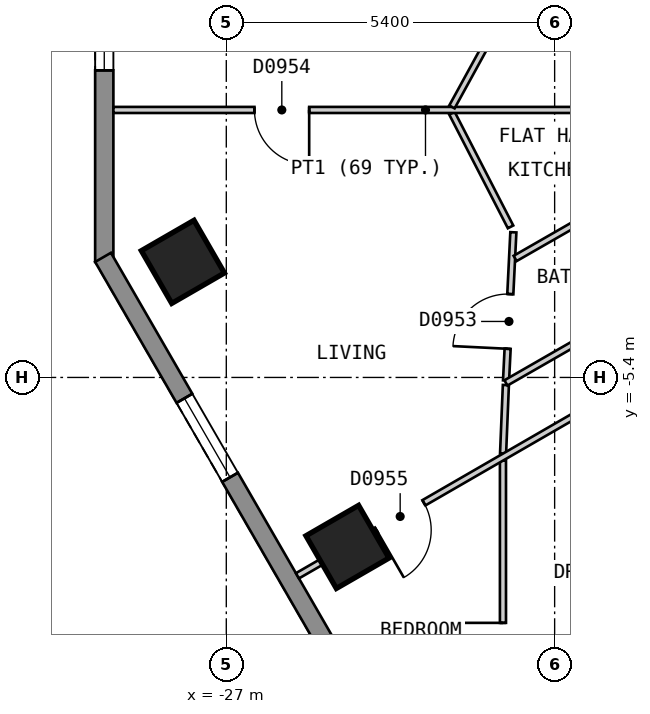
"""IFC4 building model, lengths in metres.
Left out: names, types, materials, properties, quantities, classifications, styles, units other than length and angle.
Written with IfcOpenShell. Run it as: python <this file> out.ifc"""

import sys

from ifc_helpers import new_model, si_unit, direction, frame, frame_2d, origin, origin_2d, place, context, subcontext, project, spatial, polyline, rectangle, outline, extrude, element, fill, save


model = new_model("IFC4")
c1 = context("Model", 3, precision=1e-05, world=origin(), true_north=direction((0.0, 1.0)))
c2 = subcontext(c1, "Body", "Model", "MODEL_VIEW")
j1 = project(units=[si_unit("LENGTHUNIT", "METRE"), si_unit("PLANEANGLEUNIT", "RADIAN")], contexts=[c1])
p1 = place(None, origin())
s1 = spatial("IfcSite", under=j1, at=p1, CompositionType="ELEMENT")
p2 = place(p1, origin())
s2 = spatial("IfcBuilding", under=s1, at=p2, CompositionType="ELEMENT")
p3 = place(p2, frame((0.0, 0.0, 102.0)))
s3 = spatial("IfcBuildingStorey", under=s2, at=p3, CompositionType="ELEMENT", Elevation=102.0)
for number, where, z_axis, x_axis in (
    (1, (-27.714, -3.499, 0.0), (0.0, 0.0, 1.0), (0.5, -0.866, 0.0)),
    (2, (-25.007, -8.187, 0.0), (0.0, 0.0, 1.0), (0.5, -0.866, 0.0)),
):
    element("IfcColumn", number, at=place(p3, frame(where, z_axis=z_axis, x_axis=x_axis)), inside=s3, PredefinedType="COLUMN", context=c2, shape_type="SweptSolid", body=[
        extrude(rectangle(XDim=1.0, YDim=1.0, at=origin_2d()), origin(), (0.0, 0.0, 1.0), 3.0),
    ])
p4 = place(p3, frame((-29.007, 1.5, 0.0), z_axis=(0.0, 0.0, 1.0), x_axis=(0.0, -1.0, 0.0)))
e3 = element("IfcWall", 3, at=p4, inside=s3, PredefinedType="SOLIDWALL", context=c2, shape_type="SweptSolid", body=[
    extrude(outline(polyline([(0.0, -0.15), (5.0, -0.15), (4.92, 0.15), (0.08, 0.15), (0.0, -0.15)])), origin(), (0.0, 0.0, 1.0), 2.7),
])
p5 = place(p4, frame((0.65, 0.0, 0.15)))
e4 = element("IfcOpeningElement", 4, at=p5, cuts=e3, PredefinedType="OPENING", context=c2, shape_type="SweptSolid", body=[
    extrude(rectangle(XDim=1.2, YDim=2.1, at=frame_2d((0.6, 1.05))), frame((0.0, 0.16, 0.0), z_axis=(0.0, -1.0, 0.0), x_axis=(1.0, 0.0, 0.0)), (0.0, 0.0, 1.0), 0.32),
])
p6 = place(p3, frame((-29.027, -3.425, 0.0), z_axis=(0.0, 0.0, 1.0), x_axis=(0.500035407905, -0.866004960056, 0.0)))
e5 = element("IfcWall", 5, at=p6, inside=s3, PredefinedType="SOLIDWALL", context=c2, shape_type="SweptSolid", body=[
    extrude(outline(polyline([(0.0, -0.15), (23.094, -0.15), (23.014, 0.15), (0.08, 0.15), (0.0, -0.15)])), origin(), (0.0, 0.0, 1.0), 2.7),
])
p7 = place(p6, frame((2.677, 0.0, 0.15)))
e6 = element("IfcOpeningElement", 6, at=p7, cuts=e5, PredefinedType="OPENING", context=c2, shape_type="SweptSolid", body=[
    extrude(rectangle(XDim=1.5, YDim=2.1, at=frame_2d((0.75, 1.05))), frame((0.0, 0.16, 0.0), z_axis=(0.0, -1.0, 0.0), x_axis=(1.0, 0.0, 0.0)), (0.0, 0.0, 1.0), 0.32),
])
p8 = place(p6, frame((8.091, 0.0, 0.15)))
e7 = element("IfcOpeningElement", 7, at=p8, cuts=e5, PredefinedType="OPENING", context=c2, shape_type="SweptSolid", body=[
    extrude(rectangle(XDim=1.5, YDim=2.1, at=frame_2d((0.75, 1.05))), frame((0.0, 0.16, 0.0), z_axis=(0.0, -1.0, 0.0), x_axis=(1.0, 0.0, 0.0)), (0.0, 0.0, 1.0), 0.32),
])
p9 = place(p6, frame((13.504, 0.0, 0.15)))
e8 = element("IfcOpeningElement", 8, at=p9, cuts=e5, PredefinedType="OPENING", context=c2, shape_type="SweptSolid", body=[
    extrude(rectangle(XDim=1.5, YDim=2.1, at=frame_2d((0.75, 1.05))), frame((0.0, 0.16, 0.0), z_axis=(0.0, -1.0, 0.0), x_axis=(1.0, 0.0, 0.0)), (0.0, 0.0, 1.0), 0.32),
])
p10 = place(p6, frame((18.917, 0.0, 0.15)))
e9 = element("IfcOpeningElement", 9, at=p10, cuts=e5, PredefinedType="OPENING", context=c2, shape_type="SweptSolid", body=[
    extrude(rectangle(XDim=1.5, YDim=2.1, at=frame_2d((0.75, 1.05))), frame((0.0, 0.16, 0.0), z_axis=(0.0, -1.0, 0.0), x_axis=(1.0, 0.0, 0.0)), (0.0, 0.0, 1.0), 0.32),
])
p11 = place(p3, frame((-23.289, -1.054, 0.0), z_axis=(0.0, 0.0, 1.0), x_axis=(0.458226112305, -0.888835659726, 0.0)))
e10 = element("IfcWall", 10, at=p11, inside=s3, PredefinedType="PARTITIONING", context=c2, shape_type="SweptSolid", body=[
    extrude(rectangle(XDim=2.104, YDim=0.1, at=frame_2d((1.052, 0.0))), origin(), (0.0, 0.0, 1.0), 2.7),
])
p12 = place(p3, frame((-28.857, -1.001, 0.0), z_axis=(0.0, 0.0, 1.0), x_axis=(1.0, 0.0, 0.0)))
e11 = element("IfcWall", 11, at=p12, inside=s3, PredefinedType="PARTITIONING", context=c2, shape_type="SweptSolid", body=[
    extrude(rectangle(XDim=10.266, YDim=0.1, at=frame_2d((5.133, 0.0))), origin(), (0.0, 0.0, 1.0), 2.7),
])
p13 = place(p12, frame((2.32, 0.0, 0.0)))
e12 = element("IfcOpeningElement", 12, at=p13, cuts=e11, PredefinedType="OPENING", context=c2, shape_type="SweptSolid", body=[
    extrude(rectangle(XDim=0.9, YDim=2.1, at=frame_2d((0.45, 1.05))), frame((0.0, 0.06, 0.0), z_axis=(0.0, -1.0, 0.0), x_axis=(1.0, 0.0, 0.0)), (0.0, 0.0, 1.0), 0.12),
])
p14 = place(p3, frame((-23.289, -0.951, 0.0), z_axis=(0.0, 0.0, 1.0), x_axis=(0.481164463081, 0.876630343684, 0.0)))
e13 = element("IfcWall", 13, at=p14, inside=s3, PredefinedType="PARTITIONING", context=c2, shape_type="SweptSolid", body=[
    extrude(rectangle(XDim=4.834, YDim=0.1, at=frame_2d((2.417, 0.0))), origin(), (0.0, 0.0, 1.0), 2.7),
])
p15 = place(p14, frame((2.039, 0.0, 0.0)))
e14 = element("IfcOpeningElement", 14, at=p15, cuts=e13, PredefinedType="OPENING", context=c2, shape_type="SweptSolid", body=[
    extrude(rectangle(XDim=0.8, YDim=2.1, at=frame_2d((0.4, 1.05))), frame((0.0, 0.06, 0.0), z_axis=(0.0, -1.0, 0.0), x_axis=(1.0, 0.0, 0.0)), (0.0, 0.0, 1.0), 0.12),
])
p16 = place(p3, frame((-22.399, -5.45, 0.0), z_axis=(0.0, 0.0, 1.0), x_axis=(0.049129140995, 0.998792434646, 0.0)))
e15 = element("IfcWall", 15, at=p16, inside=s3, PredefinedType="PARTITIONING", context=c2, shape_type="SweptSolid", body=[
    extrude(rectangle(XDim=2.44, YDim=0.1, at=frame_2d((1.22, 0.0))), origin(), (0.0, 0.0, 1.0), 2.7),
])
p17 = place(p16, frame((0.522, 0.0, 0.0)))
e16 = element("IfcOpeningElement", 16, at=p17, cuts=e15, PredefinedType="OPENING", context=c2, shape_type="SweptSolid", body=[
    extrude(rectangle(XDim=0.9, YDim=2.1, at=frame_2d((0.45, 1.05))), frame((0.0, 0.06, 0.0), z_axis=(0.0, -1.0, 0.0), x_axis=(1.0, 0.0, 0.0)), (0.0, 0.0, 1.0), 0.12),
])
p18 = place(p3, frame((-22.448, -6.651, 0.0), z_axis=(0.0, 0.0, 1.0), x_axis=(0.040729401597, 0.99917021365, 0.0)))
e17 = element("IfcWall", 17, at=p18, inside=s3, PredefinedType="PARTITIONING", context=c2, shape_type="SweptSolid", body=[
    extrude(rectangle(XDim=1.127, YDim=0.1, at=frame_2d((0.563, 0.0))), origin(), (0.0, 0.0, 1.0), 2.7),
])
p19 = place(p3, frame((-22.45, -12.846, 0.0), z_axis=(0.0, 0.0, 1.0), x_axis=(0.0, 1.0, 0.0)))
e18 = element("IfcWall", 18, at=p19, inside=s3, PredefinedType="PARTITIONING", context=c2, shape_type="SweptSolid", body=[
    extrude(rectangle(XDim=6.078, YDim=0.1, at=frame_2d((3.039, 0.0))), origin(), (0.0, 0.0, 1.0), 2.7),
])
p20 = place(p19, frame((2.61, 0.0, 0.0)))
e19 = element("IfcOpeningElement", 19, at=p20, cuts=e18, PredefinedType="OPENING", context=c2, shape_type="SweptSolid", body=[
    extrude(rectangle(XDim=0.8, YDim=2.1, at=frame_2d((0.4, 1.05))), frame((0.0, 0.06, 0.0), z_axis=(0.0, -1.0, 0.0), x_axis=(1.0, 0.0, 0.0)), (0.0, 0.0, 1.0), 0.12),
])
p21 = place(p3, frame((-25.83, -8.662, 0.0), z_axis=(0.0, 0.0, 1.0), x_axis=(0.866022959057, 0.500004234368, 0.0)))
e20 = element("IfcWall", 20, at=p21, inside=s3, PredefinedType="PARTITIONING", context=c2, shape_type="SweptSolid", body=[
    extrude(rectangle(XDim=10.0, YDim=0.1, at=frame_2d((5.0, 0.0))), origin(), (0.0, 0.0, 1.0), 2.7),
])
p22 = place(p21, frame((1.501, 0.0, 0.0)))
e21 = element("IfcOpeningElement", 21, at=p22, cuts=e20, PredefinedType="OPENING", context=c2, shape_type="SweptSolid", body=[
    extrude(rectangle(XDim=0.9, YDim=2.1, at=frame_2d((0.45, 1.05))), frame((0.0, 0.06, 0.0), z_axis=(0.0, -1.0, 0.0), x_axis=(1.0, 0.0, 0.0)), (0.0, 0.0, 1.0), 0.12),
])
p23 = place(p3, frame((-22.401, -5.49, 0.0), z_axis=(0.0, 0.0, 1.0), x_axis=(0.867314404256, 0.497760709749, 0.0)))
e22 = element("IfcWall", 22, at=p23, inside=s3, PredefinedType="PARTITIONING", context=c2, shape_type="SweptSolid", body=[
    extrude(rectangle(XDim=5.444, YDim=0.1, at=frame_2d((2.722, 0.0))), origin(), (0.0, 0.0, 1.0), 2.7),
])
p24 = place(p23, frame((2.372, 0.0, 0.0)))
e23 = element("IfcOpeningElement", 23, at=p24, cuts=e22, PredefinedType="OPENING", context=c2, shape_type="SweptSolid", body=[
    extrude(rectangle(XDim=0.8, YDim=2.1, at=frame_2d((0.4, 1.05))), frame((0.0, 0.06, 0.0), z_axis=(0.0, -1.0, 0.0), x_axis=(1.0, 0.0, 0.0)), (0.0, 0.0, 1.0), 0.12),
])
p25 = place(p3, frame((-22.25, -3.443, 0.0), z_axis=(0.0, 0.0, 1.0), x_axis=(0.867362741349, 0.497676476156, 0.0)))
e24 = element("IfcWall", 24, at=p25, inside=s3, PredefinedType="PARTITIONING", context=c2, shape_type="SweptSolid", body=[
    extrude(rectangle(XDim=4.29, YDim=0.1, at=frame_2d((2.145, 0.0))), origin(), (0.0, 0.0, 1.0), 2.7),
])
p26 = place(p25, frame((1.715, 0.0, 0.0)))
e25 = element("IfcOpeningElement", 25, at=p26, cuts=e24, PredefinedType="OPENING", context=c2, shape_type="SweptSolid", body=[
    extrude(rectangle(XDim=0.9, YDim=2.1, at=frame_2d((0.45, 1.05))), frame((0.0, 0.06, 0.0), z_axis=(0.0, -1.0, 0.0), x_axis=(1.0, 0.0, 0.0)), (0.0, 0.0, 1.0), 0.12),
])
p27 = place(p5, origin())
e26 = element("IfcWindow", 26, at=p27, inside=s3, PartitioningType="SINGLE_PANEL", PredefinedType="WINDOW", context=c2, shape_type="SweptSolid", body=[
    extrude(rectangle(XDim=1.2, YDim=2.1, at=frame_2d((0.6, 1.05))), frame((0.0, 0.03, 0.0), z_axis=(0.0, -1.0, 0.0), x_axis=(1.0, 0.0, 0.0)), (0.0, 0.0, 1.0), 0.06),
])
fill(e4, e26)
p28 = place(p7, origin())
e27 = element("IfcWindow", 27, at=p28, inside=s3, PartitioningType="SINGLE_PANEL", PredefinedType="WINDOW", context=c2, shape_type="SweptSolid", body=[
    extrude(rectangle(XDim=1.5, YDim=2.1, at=frame_2d((0.75, 1.05))), frame((0.0, 0.03, 0.0), z_axis=(0.0, -1.0, 0.0), x_axis=(1.0, 0.0, 0.0)), (0.0, 0.0, 1.0), 0.06),
])
fill(e6, e27)
p29 = place(p17, origin())
e28 = element("IfcDoor", 28, at=p29, inside=s3, OperationType="SINGLE_SWING_LEFT", PredefinedType="DOOR", context=c2, shape_type="SweptSolid", body=[
    extrude(rectangle(XDim=0.9, YDim=2.1, at=frame_2d((0.45, 1.05))), frame((0.0, 0.025, 0.0), z_axis=(0.0, -1.0, 0.0), x_axis=(1.0, 0.0, 0.0)), (0.0, 0.0, 1.0), 0.05),
])
fill(e16, e28)
p30 = place(p13, origin())
e29 = element("IfcDoor", 29, at=p30, inside=s3, OperationType="SINGLE_SWING_RIGHT", PredefinedType="DOOR", context=c2, shape_type="SweptSolid", body=[
    extrude(rectangle(XDim=0.9, YDim=2.1, at=frame_2d((0.45, 1.05))), frame((0.0, 0.025, 0.0), z_axis=(0.0, -1.0, 0.0), x_axis=(1.0, 0.0, 0.0)), (0.0, 0.0, 1.0), 0.05),
])
fill(e12, e29)
p31 = place(p22, origin())
e30 = element("IfcDoor", 30, at=p31, inside=s3, OperationType="SINGLE_SWING_LEFT", PredefinedType="DOOR", context=c2, shape_type="SweptSolid", body=[
    extrude(rectangle(XDim=0.9, YDim=2.1, at=frame_2d((0.45, 1.05))), frame((0.0, 0.025, 0.0), z_axis=(0.0, -1.0, 0.0), x_axis=(1.0, 0.0, 0.0)), (0.0, 0.0, 1.0), 0.05),
])
fill(e21, e30)
p32 = place(p20, origin())
e31 = element("IfcDoor", 31, at=p32, inside=s3, OperationType="SINGLE_SWING_RIGHT", PredefinedType="DOOR", context=c2, shape_type="SweptSolid", body=[
    extrude(rectangle(XDim=0.8, YDim=2.1, at=frame_2d((0.4, 1.05))), frame((0.0, 0.025, 0.0), z_axis=(0.0, -1.0, 0.0), x_axis=(1.0, 0.0, 0.0)), (0.0, 0.0, 1.0), 0.05),
])
fill(e19, e31)
save(model, sys.argv[1])
